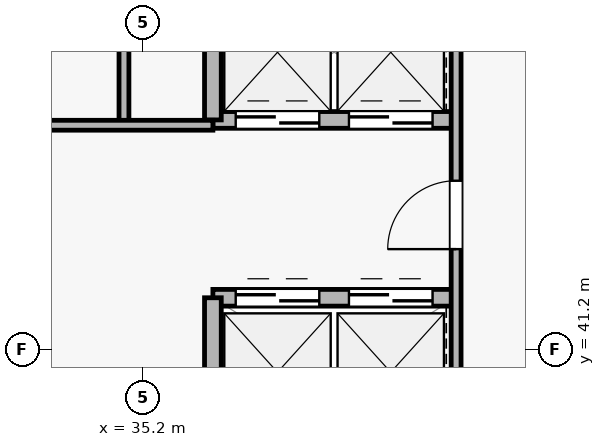
"""IFC4 building model, lengths in metres.
Left out: names, types, materials, properties, quantities, classifications, styles, units other than length and angle.
Written with IfcOpenShell. Run it as: python <this file> out.ifc"""

import sys

from ifc_helpers import new_model, si_unit, direction, frame, frame_2d, origin, place, context, subcontext, project, spatial, rectangle, extrude, source, transform, mapped, element, fill, save


model = new_model("IFC4")
c1 = context("Model", 3, precision=1e-05, world=origin(), true_north=direction((0.0, 1.0)))
c2 = subcontext(c1, "Body", "Model", "MODEL_VIEW")
j1 = project(units=[si_unit("LENGTHUNIT", "METRE"), si_unit("PLANEANGLEUNIT", "RADIAN")], contexts=[c1])
p1 = place(None, origin())
s1 = spatial("IfcSite", under=j1, at=p1, CompositionType="ELEMENT")
p2 = place(p1, origin())
s2 = spatial("IfcBuilding", under=s1, at=p2, CompositionType="ELEMENT")
p3 = place(p2, frame((0.0, 0.0, 245.1)))
s3 = spatial("IfcBuildingStorey", under=s2, at=p3, CompositionType="ELEMENT", Elevation=245.1)
p4 = place(p3, frame((36.12, 44.22, 0.0), z_axis=(0.0, 0.0, 1.0), x_axis=(1.0, 0.0, 0.0)))
e1 = element("IfcWall", 1, at=p4, inside=s3, PredefinedType="SOLIDWALL", context=c2, shape_type="SweptSolid", body=[
    extrude(rectangle(XDim=3.2, YDim=0.22, at=frame_2d((1.6, 0.0))), origin(), (0.0, 0.0, 1.0), 3.185),
])
p5 = place(p4, frame((0.3, 0.0, 0.0)))
e2 = element("IfcOpeningElement", 2, at=p5, cuts=e1, PredefinedType="OPENING", context=c2, shape_type="SweptSolid", body=[
    extrude(rectangle(XDim=1.1, YDim=2.2, at=frame_2d((0.55, 1.1))), frame((0.0, 0.12, 0.0), z_axis=(0.0, -1.0, 0.0), x_axis=(1.0, 0.0, 0.0)), (0.0, 0.0, 1.0), 0.24),
])
p6 = place(p4, frame((1.79, 0.0, 0.0)))
e3 = element("IfcOpeningElement", 3, at=p6, cuts=e1, PredefinedType="OPENING", context=c2, shape_type="SweptSolid", body=[
    extrude(rectangle(XDim=1.1, YDim=2.2, at=frame_2d((0.55, 1.1))), frame((0.0, 0.12, 0.0), z_axis=(0.0, -1.0, 0.0), x_axis=(1.0, 0.0, 0.0)), (0.0, 0.0, 1.0), 0.24),
])
p7 = place(p3, frame((36.12, 41.88, 0.0), z_axis=(0.0, 0.0, 1.0), x_axis=(1.0, 0.0, 0.0)))
e4 = element("IfcWall", 4, at=p7, inside=s3, PredefinedType="SOLIDWALL", context=c2, shape_type="SweptSolid", body=[
    extrude(rectangle(XDim=3.2, YDim=0.22, at=frame_2d((1.6, 0.0))), origin(), (0.0, 0.0, 1.0), 3.185),
])
p8 = place(p7, frame((0.3, 0.0, 0.0)))
e5 = element("IfcOpeningElement", 5, at=p8, cuts=e4, PredefinedType="OPENING", context=c2, shape_type="SweptSolid", body=[
    extrude(rectangle(XDim=1.1, YDim=2.2, at=frame_2d((0.55, 1.1))), frame((0.0, 0.12, 0.0), z_axis=(0.0, -1.0, 0.0), x_axis=(1.0, 0.0, 0.0)), (0.0, 0.0, 1.0), 0.24),
])
p9 = place(p7, frame((1.79, 0.0, 0.0)))
e6 = element("IfcOpeningElement", 6, at=p9, cuts=e4, PredefinedType="OPENING", context=c2, shape_type="SweptSolid", body=[
    extrude(rectangle(XDim=1.1, YDim=2.2, at=frame_2d((0.55, 1.1))), frame((0.0, 0.12, 0.0), z_axis=(0.0, -1.0, 0.0), x_axis=(1.0, 0.0, 0.0)), (0.0, 0.0, 1.0), 0.24),
])
p10 = place(p3, frame((36.12, 39.92, 0.0), z_axis=(0.0, 0.0, 1.0), x_axis=(0.0, 1.0, 0.0)))
e7 = element("IfcWall", 7, at=p10, inside=s3, PredefinedType="SOLIDWALL", context=c2, shape_type="SweptSolid", body=[
    extrude(rectangle(XDim=1.96, YDim=0.22, at=frame_2d((0.98, 0.0))), origin(), (0.0, 0.0, 1.0), 3.185),
])
p11 = place(p3, frame((36.12, 44.22, 0.0), z_axis=(0.0, 0.0, 1.0), x_axis=(0.0, 1.0, 0.0)))
e8 = element("IfcWall", 8, at=p11, inside=s3, PredefinedType="SOLIDWALL", context=c2, shape_type="SweptSolid", body=[
    extrude(rectangle(XDim=2.125, YDim=0.22, at=frame_2d((1.062, 0.0))), origin(), (0.0, 0.0, 1.0), 3.185),
])
p12 = place(p3, frame((34.95, 44.15, 0.0), z_axis=(0.0, 0.0, 1.0), x_axis=(0.0, 1.0, 0.0)))
e9 = element("IfcWall", 9, at=p12, inside=s3, PredefinedType="PARTITIONING", context=c2, shape_type="SweptSolid", body=[
    extrude(rectangle(XDim=2.195, YDim=0.13, at=frame_2d((1.098, 0.0))), origin(), (0.0, 0.0, 1.0), 3.185),
])
p13 = place(p3, frame((33.18, 44.15, 0.0), z_axis=(0.0, 0.0, 1.0), x_axis=(1.0, 0.0, 0.0)))
e10 = element("IfcWall", 10, at=p13, inside=s3, PredefinedType="PARTITIONING", context=c2, shape_type="SweptSolid", body=[
    extrude(rectangle(XDim=2.94, YDim=0.13, at=frame_2d((1.47, 0.0))), origin(), (0.0, 0.0, 1.0), 2.47),
])
p14 = place(p3, frame((39.32, 37.655, 0.0), z_axis=(0.0, 0.0, 1.0), x_axis=(0.0, 1.0, 0.0)))
e11 = element("IfcWall", 11, at=p14, inside=s3, PredefinedType="PARTITIONING", context=c2, shape_type="SweptSolid", body=[
    extrude(rectangle(XDim=8.69, YDim=0.13, at=frame_2d((4.345, 0.0))), origin(), (0.0, 0.0, 1.0), 3.185),
])
p15 = place(p14, frame((4.865, 0.0, 0.0)))
e12 = element("IfcOpeningElement", 12, at=p15, cuts=e11, PredefinedType="OPENING", context=c2, shape_type="SweptSolid", body=[
    extrude(rectangle(XDim=0.9, YDim=2.1, at=frame_2d((0.45, 1.05))), frame((0.0, 0.075, 0.0), z_axis=(0.0, -1.0, 0.0), x_axis=(1.0, 0.0, 0.0)), (0.0, 0.0, 1.0), 0.15),
])
m1 = source(origin(), c2, "Body", "SweptSolid", [
    extrude(rectangle(XDim=1.1, YDim=2.2, at=frame_2d((0.55, 1.1))), frame((0.0, 0.025, 0.0), z_axis=(0.0, -1.0, 0.0), x_axis=(1.0, 0.0, 0.0)), (0.0, 0.0, 1.0), 0.05),
])
p16 = place(p5, origin())
e13 = element("IfcDoor", 13, at=p16, inside=s3, OperationType="SLIDING_TO_LEFT", PredefinedType="DOOR", context=c2, shape_type="MappedRepresentation", body=[
    mapped(m1, transform((0.0, 0.0, 0.0), x_axis=(1.0, 0.0, 0.0), y_axis=(0.0, 1.0, 0.0), z_axis=(0.0, 0.0, 1.0), scale=1.0)),
])
fill(e2, e13)
p17 = place(p6, origin())
e14 = element("IfcDoor", 14, at=p17, inside=s3, OperationType="SLIDING_TO_LEFT", PredefinedType="DOOR", context=c2, shape_type="MappedRepresentation", body=[
    mapped(m1, transform((0.0, 0.0, 0.0), x_axis=(1.0, 0.0, 0.0), y_axis=(0.0, 1.0, 0.0), z_axis=(0.0, 0.0, 1.0), scale=1.0)),
])
fill(e3, e14)
p18 = place(p8, origin())
e15 = element("IfcDoor", 15, at=p18, inside=s3, OperationType="SLIDING_TO_LEFT", PredefinedType="DOOR", context=c2, shape_type="MappedRepresentation", body=[
    mapped(m1, transform((0.0, 0.0, 0.0), x_axis=(1.0, 0.0, 0.0), y_axis=(0.0, 1.0, 0.0), z_axis=(0.0, 0.0, 1.0), scale=1.0)),
])
fill(e5, e15)
p19 = place(p9, origin())
e16 = element("IfcDoor", 16, at=p19, inside=s3, OperationType="SLIDING_TO_LEFT", PredefinedType="DOOR", context=c2, shape_type="MappedRepresentation", body=[
    mapped(m1, transform((0.0, 0.0, 0.0), x_axis=(1.0, 0.0, 0.0), y_axis=(0.0, 1.0, 0.0), z_axis=(0.0, 0.0, 1.0), scale=1.0)),
])
fill(e6, e16)
m2 = source(origin(), c2, "Body", "SweptSolid", [
    extrude(rectangle(XDim=0.9, YDim=2.1, at=frame_2d((0.45, 1.05))), frame((0.0, 0.025, 0.0), z_axis=(0.0, -1.0, 0.0), x_axis=(1.0, 0.0, 0.0)), (0.0, 0.0, 1.0), 0.05),
])
p20 = place(p15, origin())
e17 = element("IfcDoor", 17, at=p20, inside=s3, OperationType="SINGLE_SWING_LEFT", PredefinedType="DOOR", context=c2, shape_type="MappedRepresentation", body=[
    mapped(m2, transform((0.0, 0.0, 0.0), x_axis=(1.0, 0.0, 0.0), y_axis=(0.0, 1.0, 0.0), z_axis=(0.0, 0.0, 1.0), scale=1.0)),
])
fill(e12, e17)
save(model, sys.argv[1])
